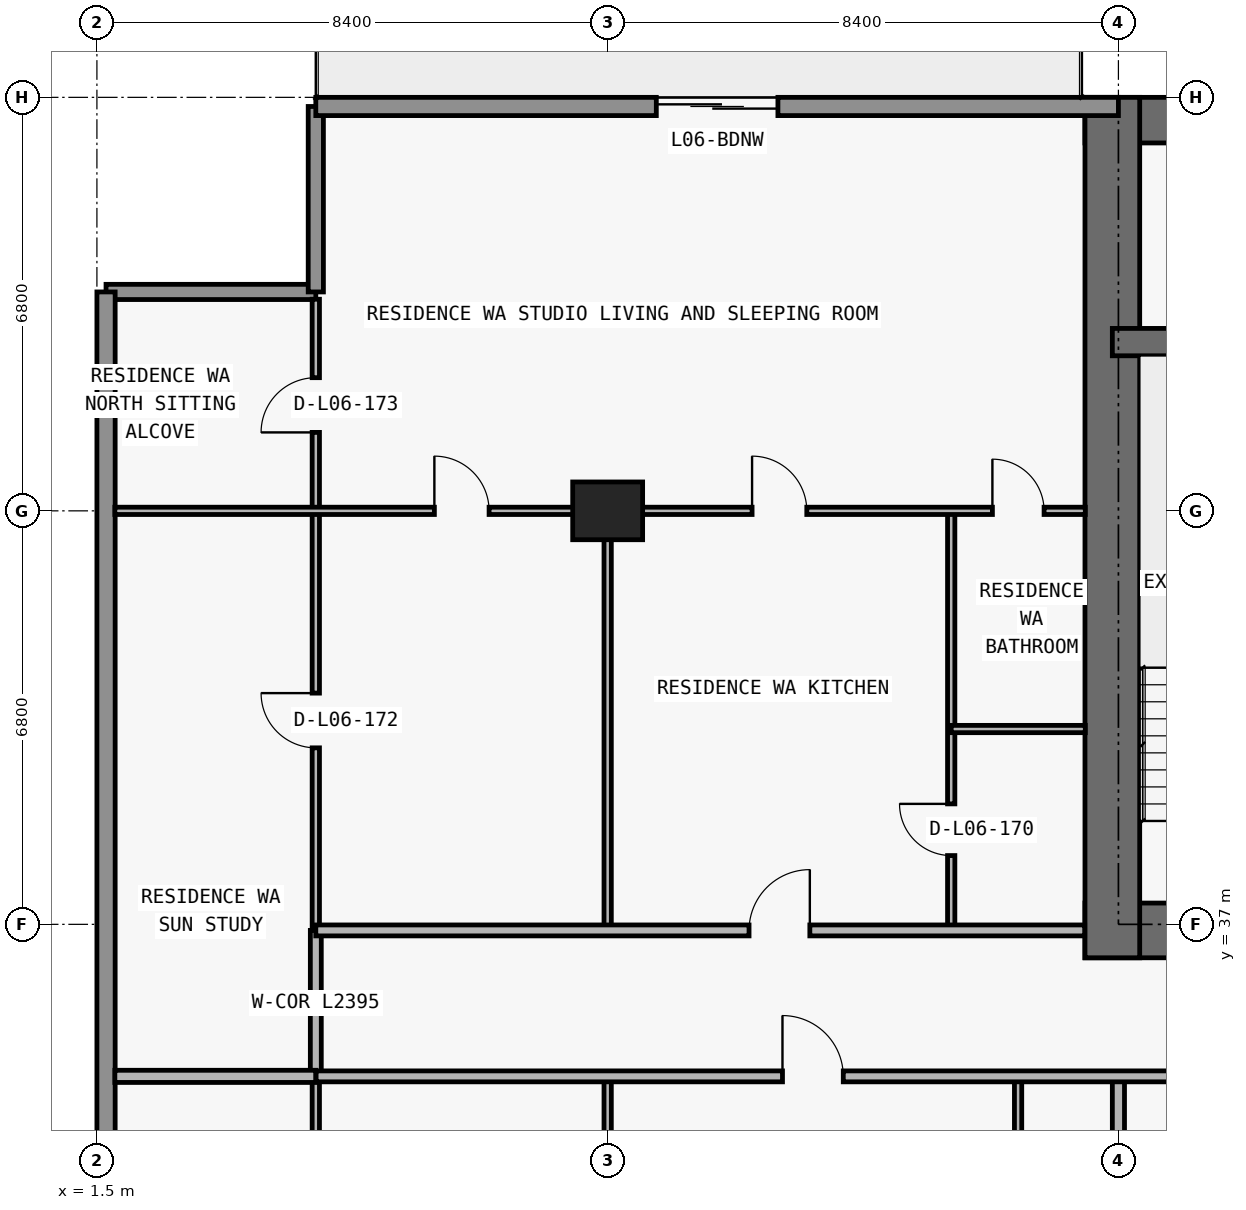
"""IFC4 building model, lengths in metres.
Left out: names, types, materials, properties, quantities, classifications, styles, units other than length and angle.
Written with IfcOpenShell. Run it as: python <this file> out.ifc"""

import sys

from ifc_helpers import new_model, si_unit, direction, frame, frame_2d, origin, origin_2d, place, context, subcontext, project, spatial, rectangle, extrude, element, fill, save


model = new_model("IFC4")
c1 = context("Model", 3, precision=1e-05, world=origin(), true_north=direction((0.0, 1.0)))
c2 = subcontext(c1, "Body", "Model", "MODEL_VIEW")
j1 = project(units=[si_unit("LENGTHUNIT", "METRE"), si_unit("PLANEANGLEUNIT", "RADIAN")], contexts=[c1])
p1 = place(None, origin())
s1 = spatial("IfcSite", under=j1, at=p1, CompositionType="ELEMENT")
p2 = place(p1, origin())
s2 = spatial("IfcBuilding", under=s1, at=p2, CompositionType="ELEMENT")
p3 = place(p2, frame((0.0, 0.0, 30.0)))
s3 = spatial("IfcBuildingStorey", under=s2, at=p3, CompositionType="ELEMENT", Elevation=30.0)
p4 = place(p3, frame((9.9, 43.8, 0.0), z_axis=(0.0, 0.0, 1.0), x_axis=(1.0, 0.0, 0.0)))
e1 = element("IfcColumn", 1, at=p4, inside=s3, PredefinedType="COLUMN", context=c2, shape_type="SweptSolid", body=[
    extrude(rectangle(XDim=1.15, YDim=0.95, at=origin_2d()), origin(), (0.0, 0.0, 1.0), 3.05),
])
p5 = place(p3, frame((17.75, 36.9, 0.0), z_axis=(0.0, 0.0, 1.0), x_axis=(1.0, 0.0, 0.0)))
e2 = element("IfcWall", 2, at=p5, inside=s3, PredefinedType="SHEAR", context=c2, shape_type="SweptSolid", body=[
    extrude(rectangle(XDim=42.3, YDim=0.9, at=frame_2d((21.15, 0.0))), origin(), (0.0, 0.0, 1.0), 3.05),
])
p6 = place(p5, frame((14.55, 0.0, 0.0)))
e3 = element("IfcOpeningElement", 3, at=p6, cuts=e2, PredefinedType="OPENING", context=c2, shape_type="SweptSolid", body=[
    extrude(rectangle(XDim=1.1, YDim=2.15, at=frame_2d((0.55, 1.075))), frame((0.0, 0.46, 0.0), z_axis=(0.0, -1.0, 0.0), x_axis=(1.0, 0.0, 0.0)), (0.0, 0.0, 1.0), 0.92),
])
p7 = place(p5, frame((6.4, 0.0, 0.0)))
e4 = element("IfcOpeningElement", 4, at=p7, cuts=e2, PredefinedType="OPENING", context=c2, shape_type="SweptSolid", body=[
    extrude(rectangle(XDim=1.05, YDim=2.15, at=frame_2d((0.525, 1.075))), frame((0.0, 0.46, 0.0), z_axis=(0.0, -1.0, 0.0), x_axis=(1.0, 0.0, 0.0)), (0.0, 0.0, 1.0), 0.92),
])
p8 = place(p5, frame((34.9, 0.0, 0.0)))
e5 = element("IfcOpeningElement", 5, at=p8, cuts=e2, PredefinedType="OPENING", context=c2, shape_type="SweptSolid", body=[
    extrude(rectangle(XDim=1.05, YDim=2.15, at=frame_2d((0.525, 1.075))), frame((0.0, 0.46, 0.0), z_axis=(0.0, -1.0, 0.0), x_axis=(1.0, 0.0, 0.0)), (0.0, 0.0, 1.0), 0.92),
])
p9 = place(p5, frame((11.012, 0.0, 0.0)))
e6 = element("IfcOpeningElement", 6, at=p9, cuts=e2, PredefinedType="OPENING", context=c2, shape_type="SweptSolid", body=[
    extrude(rectangle(XDim=1.05, YDim=2.15, at=frame_2d((0.525, 1.075))), frame((0.0, 0.46, 0.0), z_axis=(0.0, -1.0, 0.0), x_axis=(1.0, 0.0, 0.0)), (0.0, 0.0, 1.0), 0.92),
])
p10 = place(p5, frame((24.25, 0.0, 0.0)))
e7 = element("IfcOpeningElement", 7, at=p10, cuts=e2, PredefinedType="OPENING", context=c2, shape_type="SweptSolid", body=[
    extrude(rectangle(XDim=1.05, YDim=2.15, at=frame_2d((0.525, 1.075))), frame((0.0, 0.46, 0.0), z_axis=(0.0, -1.0, 0.0), x_axis=(1.0, 0.0, 0.0)), (0.0, 0.0, 1.0), 0.92),
])
p11 = place(p3, frame((17.75, 50.225, 0.0), z_axis=(0.0, 0.0, 1.0), x_axis=(1.0, 0.0, 0.0)))
e8 = element("IfcWall", 8, at=p11, inside=s3, PredefinedType="SHEAR", context=c2, shape_type="SweptSolid", body=[
    extrude(rectangle(XDim=42.3, YDim=0.75, at=frame_2d((21.15, 0.0))), origin(), (0.0, 0.0, 1.0), 3.05),
])
p12 = place(p3, frame((18.2, 36.45, 0.0), z_axis=(0.0, 0.0, 1.0), x_axis=(0.0, 1.0, 0.0)))
e9 = element("IfcWall", 9, at=p12, inside=s3, PredefinedType="SHEAR", context=c2, shape_type="SweptSolid", body=[
    extrude(rectangle(XDim=14.15, YDim=0.9, at=frame_2d((7.075, 0.0))), origin(), (0.0, 0.0, 1.0), 3.05),
])
p13 = place(p3, frame((18.2, 46.575, 0.0), z_axis=(0.0, 0.0, 1.0), x_axis=(1.0, 0.0, 0.0)))
e10 = element("IfcWall", 10, at=p13, inside=s3, PredefinedType="SHEAR", context=c2, shape_type="SweptSolid", body=[
    extrude(rectangle(XDim=41.4, YDim=0.45, at=frame_2d((20.7, 0.0))), origin(), (0.0, 0.0, 1.0), 3.05),
])
p14 = place(p13, frame((7.675, 0.0, 0.0)))
e11 = element("IfcOpeningElement", 11, at=p14, cuts=e10, PredefinedType="OPENING", context=c2, shape_type="SweptSolid", body=[
    extrude(rectangle(XDim=1.05, YDim=2.15, at=frame_2d((0.525, 1.075))), frame((0.0, 0.235, 0.0), z_axis=(0.0, -1.0, 0.0), x_axis=(1.0, 0.0, 0.0)), (0.0, 0.0, 1.0), 0.47),
])
p15 = place(p13, frame((32.725, 0.0, 0.0)))
e12 = element("IfcOpeningElement", 12, at=p15, cuts=e10, PredefinedType="OPENING", context=c2, shape_type="SweptSolid", body=[
    extrude(rectangle(XDim=1.05, YDim=2.15, at=frame_2d((0.525, 1.075))), frame((0.0, 0.235, 0.0), z_axis=(0.0, -1.0, 0.0), x_axis=(1.0, 0.0, 0.0)), (0.0, 0.0, 1.0), 0.47),
])
p16 = place(p3, frame((1.65, 47.4, 0.0), z_axis=(0.0, 0.0, 1.0), x_axis=(1.0, 0.0, 0.0)))
e13 = element("IfcWall", 13, at=p16, inside=s3, PredefinedType="ELEMENTEDWALL", context=c2, shape_type="SweptSolid", body=[
    extrude(rectangle(XDim=3.45, YDim=0.25, at=frame_2d((1.725, 0.0))), origin(), (0.0, 0.0, 1.0), 3.05),
])
p17 = place(p3, frame((5.1, 47.4, 0.0), z_axis=(0.0, 0.0, 1.0), x_axis=(0.0, 1.0, 0.0)))
e14 = element("IfcWall", 14, at=p17, inside=s3, PredefinedType="ELEMENTEDWALL", context=c2, shape_type="SweptSolid", body=[
    extrude(rectangle(XDim=3.05, YDim=0.25, at=frame_2d((1.525, 0.0))), origin(), (0.0, 0.0, 1.0), 3.05),
])
p18 = place(p3, frame((1.65, 26.8, 0.0), z_axis=(0.0, 0.0, 1.0), x_axis=(0.0, 1.0, 0.0)))
e15 = element("IfcWall", 15, at=p18, inside=s3, PredefinedType="STANDARD", context=c2, shape_type="SweptSolid", body=[
    extrude(rectangle(XDim=20.6, YDim=0.3, at=frame_2d((10.3, 0.0))), origin(), (0.0, 0.0, 1.0), 3.05),
])
p19 = place(p3, frame((5.1, 50.45, 0.0), z_axis=(0.0, 0.0, 1.0), x_axis=(1.0, 0.0, 0.0)))
e16 = element("IfcWall", 16, at=p19, inside=s3, PredefinedType="STANDARD", context=c2, shape_type="SweptSolid", body=[
    extrude(rectangle(XDim=13.2, YDim=0.3, at=frame_2d((6.6, 0.0))), origin(), (0.0, 0.0, 1.0), 3.05),
])
p20 = place(p19, frame((5.6, 0.0, 0.0)))
e17 = element("IfcOpeningElement", 17, at=p20, cuts=e16, PredefinedType="OPENING", context=c2, shape_type="SweptSolid", body=[
    extrude(rectangle(XDim=2.0, YDim=2.3, at=frame_2d((1.0, 1.15))), frame((0.0, 0.16, 0.0), z_axis=(0.0, -1.0, 0.0), x_axis=(1.0, 0.0, 0.0)), (0.0, 0.0, 1.0), 0.32),
])
p21 = place(p3, frame((5.1, 27.64, 0.0), z_axis=(0.0, 0.0, 1.0), x_axis=(0.0, 1.0, 0.0)))
e18 = element("IfcWall", 18, at=p21, inside=s3, PredefinedType="PARTITIONING", context=c2, shape_type="SweptSolid", body=[
    extrude(rectangle(XDim=6.86, YDim=0.12, at=frame_2d((3.43, 0.0))), origin(), (0.0, 0.0, 1.0), 3.05),
])
p22 = place(p3, frame((5.1, 34.505, 0.0), z_axis=(0.0, 0.0, 1.0), x_axis=(0.0, 1.0, 0.0)))
e19 = element("IfcWall", 19, at=p22, inside=s3, PredefinedType="PARTITIONING", context=c2, shape_type="SweptSolid", body=[
    extrude(rectangle(XDim=2.395, YDim=0.18, at=frame_2d((1.198, 0.0))), origin(), (0.0, 0.0, 1.0), 3.05),
])
p23 = place(p3, frame((5.1, 36.905, 0.0), z_axis=(0.0, 0.0, 1.0), x_axis=(0.0, 1.0, 0.0)))
e20 = element("IfcWall", 20, at=p23, inside=s3, PredefinedType="PARTITIONING", context=c2, shape_type="SweptSolid", body=[
    extrude(rectangle(XDim=10.375, YDim=0.12, at=frame_2d((5.188, 0.0))), origin(), (0.0, 0.0, 1.0), 3.05),
])
p24 = place(p23, frame((2.998, 0.0, 0.0)))
e21 = element("IfcOpeningElement", 21, at=p24, cuts=e20, PredefinedType="OPENING", context=c2, shape_type="SweptSolid", body=[
    extrude(rectangle(XDim=0.9, YDim=2.15, at=frame_2d((0.45, 1.075))), frame((0.0, 0.07, 0.0), z_axis=(0.0, -1.0, 0.0), x_axis=(1.0, 0.0, 0.0)), (0.0, 0.0, 1.0), 0.14),
])
p25 = place(p23, frame((8.185, 0.0, 0.0)))
e22 = element("IfcOpeningElement", 22, at=p25, cuts=e20, PredefinedType="OPENING", context=c2, shape_type="SweptSolid", body=[
    extrude(rectangle(XDim=0.9, YDim=2.15, at=frame_2d((0.45, 1.075))), frame((0.0, 0.07, 0.0), z_axis=(0.0, -1.0, 0.0), x_axis=(1.0, 0.0, 0.0)), (0.0, 0.0, 1.0), 0.14),
])
p26 = place(p3, frame((9.9, 27.64, 0.0), z_axis=(0.0, 0.0, 1.0), x_axis=(0.0, 1.0, 0.0)))
e23 = element("IfcWall", 23, at=p26, inside=s3, PredefinedType="PARTITIONING", context=c2, shape_type="SweptSolid", body=[
    extrude(rectangle(XDim=6.86, YDim=0.12, at=frame_2d((3.43, 0.0))), origin(), (0.0, 0.0, 1.0), 2.11),
])
p27 = place(p3, frame((9.9, 36.9, 0.0), z_axis=(0.0, 0.0, 1.0), x_axis=(0.0, 1.0, 0.0)))
e24 = element("IfcWall", 24, at=p27, inside=s3, PredefinedType="PARTITIONING", context=c2, shape_type="SweptSolid", body=[
    extrude(rectangle(XDim=6.9, YDim=0.12, at=frame_2d((3.45, 0.0))), origin(), (0.0, 0.0, 1.0), 2.11),
])
p28 = place(p3, frame((15.55, 36.9, 0.0), z_axis=(0.0, 0.0, 1.0), x_axis=(0.0, 1.0, 0.0)))
e25 = element("IfcWall", 25, at=p28, inside=s3, PredefinedType="PARTITIONING", context=c2, shape_type="SweptSolid", body=[
    extrude(rectangle(XDim=6.9, YDim=0.12, at=frame_2d((3.45, 0.0))), origin(), (0.0, 0.0, 1.0), 3.05),
])
p29 = place(p28, frame((1.231, 0.0, 0.0)))
e26 = element("IfcOpeningElement", 26, at=p29, cuts=e25, PredefinedType="OPENING", context=c2, shape_type="SweptSolid", body=[
    extrude(rectangle(XDim=0.85, YDim=2.1, at=frame_2d((0.425, 1.05))), frame((0.0, 0.07, 0.0), z_axis=(0.0, -1.0, 0.0), x_axis=(1.0, 0.0, 0.0)), (0.0, 0.0, 1.0), 0.14),
])
p30 = place(p3, frame((16.65, 27.64, 0.0), z_axis=(0.0, 0.0, 1.0), x_axis=(0.0, 1.0, 0.0)))
e27 = element("IfcWall", 27, at=p30, inside=s3, PredefinedType="PARTITIONING", context=c2, shape_type="SweptSolid", body=[
    extrude(rectangle(XDim=6.86, YDim=0.12, at=frame_2d((3.43, 0.0))), origin(), (0.0, 0.0, 1.0), 3.05),
])
p31 = place(p30, frame((3.005, 0.0, 0.0)))
e28 = element("IfcOpeningElement", 28, at=p31, cuts=e27, PredefinedType="OPENING", context=c2, shape_type="SweptSolid", body=[
    extrude(rectangle(XDim=0.85, YDim=2.1, at=frame_2d((0.425, 1.05))), frame((0.0, 0.07, 0.0), z_axis=(0.0, -1.0, 0.0), x_axis=(1.0, 0.0, 0.0)), (0.0, 0.0, 1.0), 0.14),
])
p32 = place(p3, frame((18.3, 27.64, 0.0), z_axis=(0.0, 0.0, 1.0), x_axis=(0.0, 1.0, 0.0)))
e29 = element("IfcWall", 29, at=p32, inside=s3, PredefinedType="PARTITIONING", context=c2, shape_type="SweptSolid", body=[
    extrude(rectangle(XDim=6.86, YDim=0.2, at=frame_2d((3.43, 0.0))), origin(), (0.0, 0.0, 1.0), 2.11),
])
p33 = place(p3, frame((1.795, 34.5, 0.0), z_axis=(0.0, 0.0, 1.0), x_axis=(1.0, 0.0, 0.0)))
e30 = element("IfcWall", 30, at=p33, inside=s3, PredefinedType="PARTITIONING", context=c2, shape_type="SweptSolid", body=[
    extrude(rectangle(XDim=3.305, YDim=0.2, at=frame_2d((1.653, 0.0))), origin(), (0.0, 0.0, 1.0), 3.05),
])
p34 = place(p3, frame((5.105, 34.5, 0.0), z_axis=(0.0, 0.0, 1.0), x_axis=(1.0, 0.0, 0.0)))
e31 = element("IfcWall", 31, at=p34, inside=s3, PredefinedType="PARTITIONING", context=c2, shape_type="SweptSolid", body=[
    extrude(rectangle(XDim=50.781, YDim=0.18, at=frame_2d((25.391, 0.0))), origin(), (0.0, 0.0, 1.0), 3.05),
])
p35 = place(p34, frame((7.67, 0.0, 0.0)))
e32 = element("IfcOpeningElement", 32, at=p35, cuts=e31, PredefinedType="OPENING", context=c2, shape_type="SweptSolid", body=[
    extrude(rectangle(XDim=1.0, YDim=2.2, at=frame_2d((0.5, 1.1))), frame((0.0, 0.1, 0.0), z_axis=(0.0, -1.0, 0.0), x_axis=(1.0, 0.0, 0.0)), (0.0, 0.0, 1.0), 0.2),
])
p36 = place(p34, frame((16.07, 0.0, 0.0)))
e33 = element("IfcOpeningElement", 33, at=p36, cuts=e31, PredefinedType="OPENING", context=c2, shape_type="SweptSolid", body=[
    extrude(rectangle(XDim=1.0, YDim=2.2, at=frame_2d((0.5, 1.1))), frame((0.0, 0.1, 0.0), z_axis=(0.0, -1.0, 0.0), x_axis=(1.0, 0.0, 0.0)), (0.0, 0.0, 1.0), 0.2),
])
p37 = place(p34, frame((24.47, 0.0, 0.0)))
e34 = element("IfcOpeningElement", 34, at=p37, cuts=e31, PredefinedType="OPENING", context=c2, shape_type="SweptSolid", body=[
    extrude(rectangle(XDim=1.0, YDim=2.2, at=frame_2d((0.5, 1.1))), frame((0.0, 0.1, 0.0), z_axis=(0.0, -1.0, 0.0), x_axis=(1.0, 0.0, 0.0)), (0.0, 0.0, 1.0), 0.2),
])
p38 = place(p34, frame((32.545, 0.0, 0.0)))
e35 = element("IfcOpeningElement", 35, at=p38, cuts=e31, PredefinedType="OPENING", context=c2, shape_type="SweptSolid", body=[
    extrude(rectangle(XDim=1.0, YDim=2.2, at=frame_2d((0.5, 1.1))), frame((0.0, 0.1, 0.0), z_axis=(0.0, -1.0, 0.0), x_axis=(1.0, 0.0, 0.0)), (0.0, 0.0, 1.0), 0.2),
])
p39 = place(p34, frame((47.888, 0.0, 0.0)))
e36 = element("IfcOpeningElement", 36, at=p39, cuts=e31, PredefinedType="OPENING", context=c2, shape_type="SweptSolid", body=[
    extrude(rectangle(XDim=1.0, YDim=2.2, at=frame_2d((0.5, 1.1))), frame((0.0, 0.1, 0.0), z_axis=(0.0, -1.0, 0.0), x_axis=(1.0, 0.0, 0.0)), (0.0, 0.0, 1.0), 0.2),
])
p40 = place(p3, frame((5.1, 36.9, 0.0), z_axis=(0.0, 0.0, 1.0), x_axis=(1.0, 0.0, 0.0)))
e37 = element("IfcWall", 37, at=p40, inside=s3, PredefinedType="PARTITIONING", context=c2, shape_type="SweptSolid", body=[
    extrude(rectangle(XDim=12.645, YDim=0.18, at=frame_2d((6.323, 0.0))), origin(), (0.0, 0.0, 1.0), 3.05),
])
p41 = place(p40, frame((7.125, 0.0, 0.0)))
e38 = element("IfcOpeningElement", 38, at=p41, cuts=e37, PredefinedType="OPENING", context=c2, shape_type="SweptSolid", body=[
    extrude(rectangle(XDim=1.0, YDim=2.2, at=frame_2d((0.5, 1.1))), frame((0.0, 0.1, 0.0), z_axis=(0.0, -1.0, 0.0), x_axis=(1.0, 0.0, 0.0)), (0.0, 0.0, 1.0), 0.2),
])
p42 = place(p3, frame((15.55, 40.212, 0.0), z_axis=(0.0, 0.0, 1.0), x_axis=(1.0, 0.0, 0.0)))
e39 = element("IfcWall", 39, at=p42, inside=s3, PredefinedType="PARTITIONING", context=c2, shape_type="SweptSolid", body=[
    extrude(rectangle(XDim=2.205, YDim=0.12, at=frame_2d((1.103, 0.0))), origin(), (0.0, 0.0, 1.0), 3.05),
])
p43 = place(p3, frame((1.795, 43.8, 0.0), z_axis=(0.0, 0.0, 1.0), x_axis=(1.0, 0.0, 0.0)))
e40 = element("IfcWall", 40, at=p43, inside=s3, PredefinedType="PARTITIONING", context=c2, shape_type="SweptSolid", body=[
    extrude(rectangle(XDim=15.96, YDim=0.12, at=frame_2d((7.98, 0.0))), origin(), (0.0, 0.0, 1.0), 2.339),
])
p44 = place(p43, frame((5.255, 0.0, 0.0)))
e41 = element("IfcOpeningElement", 41, at=p44, cuts=e40, PredefinedType="OPENING", context=c2, shape_type="SweptSolid", body=[
    extrude(rectangle(XDim=0.9, YDim=2.15, at=frame_2d((0.45, 1.075))), frame((0.0, 0.07, 0.0), z_axis=(0.0, -1.0, 0.0), x_axis=(1.0, 0.0, 0.0)), (0.0, 0.0, 1.0), 0.14),
])
p45 = place(p43, frame((10.48, 0.0, 0.0)))
e42 = element("IfcOpeningElement", 42, at=p45, cuts=e40, PredefinedType="OPENING", context=c2, shape_type="SweptSolid", body=[
    extrude(rectangle(XDim=0.9, YDim=2.15, at=frame_2d((0.45, 1.075))), frame((0.0, 0.07, 0.0), z_axis=(0.0, -1.0, 0.0), x_axis=(1.0, 0.0, 0.0)), (0.0, 0.0, 1.0), 0.14),
])
p46 = place(p43, frame((14.433, 0.0, 0.0)))
e43 = element("IfcOpeningElement", 43, at=p46, cuts=e40, PredefinedType="OPENING", context=c2, shape_type="SweptSolid", body=[
    extrude(rectangle(XDim=0.85, YDim=2.1, at=frame_2d((0.425, 1.05))), frame((0.0, 0.07, 0.0), z_axis=(0.0, -1.0, 0.0), x_axis=(1.0, 0.0, 0.0)), (0.0, 0.0, 1.0), 0.14),
])
p47 = place(p20, origin())
e44 = element("IfcDoor", 44, at=p47, inside=s3, OperationType="DOUBLE_DOOR_SLIDING", PredefinedType="DOOR", context=c2, shape_type="SweptSolid", body=[
    extrude(rectangle(XDim=2.0, YDim=2.3, at=frame_2d((1.0, 1.15))), frame((0.0, 0.025, 0.0), z_axis=(0.0, -1.0, 0.0), x_axis=(1.0, 0.0, 0.0)), (0.0, 0.0, 1.0), 0.05),
])
fill(e17, e44)
p48 = place(p35, origin())
e45 = element("IfcDoor", 45, at=p48, inside=s3, OperationType="SINGLE_SWING_LEFT", PredefinedType="DOOR", context=c2, shape_type="SweptSolid", body=[
    extrude(rectangle(XDim=1.0, YDim=2.2, at=frame_2d((0.5, 1.1))), frame((0.0, 0.025, 0.0), z_axis=(0.0, -1.0, 0.0), x_axis=(1.0, 0.0, 0.0)), (0.0, 0.0, 1.0), 0.05),
])
fill(e32, e45)
p49 = place(p44, origin())
e46 = element("IfcDoor", 46, at=p49, inside=s3, OperationType="SINGLE_SWING_LEFT", PredefinedType="DOOR", context=c2, shape_type="SweptSolid", body=[
    extrude(rectangle(XDim=0.9, YDim=2.15, at=frame_2d((0.45, 1.075))), frame((0.0, 0.025, 0.0), z_axis=(0.0, -1.0, 0.0), x_axis=(1.0, 0.0, 0.0)), (0.0, 0.0, 1.0), 0.05),
])
fill(e41, e46)
p50 = place(p41, origin())
e47 = element("IfcDoor", 47, at=p50, inside=s3, OperationType="SINGLE_SWING_RIGHT", PredefinedType="DOOR", context=c2, shape_type="SweptSolid", body=[
    extrude(rectangle(XDim=1.0, YDim=2.2, at=frame_2d((0.5, 1.1))), frame((0.0, 0.025, 0.0), z_axis=(0.0, -1.0, 0.0), x_axis=(1.0, 0.0, 0.0)), (0.0, 0.0, 1.0), 0.05),
])
fill(e38, e47)
p51 = place(p45, origin())
e48 = element("IfcDoor", 48, at=p51, inside=s3, OperationType="SINGLE_SWING_LEFT", PredefinedType="DOOR", context=c2, shape_type="SweptSolid", body=[
    extrude(rectangle(XDim=0.9, YDim=2.15, at=frame_2d((0.45, 1.075))), frame((0.0, 0.025, 0.0), z_axis=(0.0, -1.0, 0.0), x_axis=(1.0, 0.0, 0.0)), (0.0, 0.0, 1.0), 0.05),
])
fill(e42, e48)
p52 = place(p29, origin())
e49 = element("IfcDoor", 49, at=p52, inside=s3, OperationType="SINGLE_SWING_RIGHT", PredefinedType="DOOR", context=c2, shape_type="SweptSolid", body=[
    extrude(rectangle(XDim=0.85, YDim=2.1, at=frame_2d((0.425, 1.05))), frame((0.0, 0.025, 0.0), z_axis=(0.0, -1.0, 0.0), x_axis=(1.0, 0.0, 0.0)), (0.0, 0.0, 1.0), 0.05),
])
fill(e26, e49)
p53 = place(p46, origin())
e50 = element("IfcDoor", 50, at=p53, inside=s3, OperationType="SINGLE_SWING_LEFT", PredefinedType="DOOR", context=c2, shape_type="SweptSolid", body=[
    extrude(rectangle(XDim=0.85, YDim=2.1, at=frame_2d((0.425, 1.05))), frame((0.0, 0.025, 0.0), z_axis=(0.0, -1.0, 0.0), x_axis=(1.0, 0.0, 0.0)), (0.0, 0.0, 1.0), 0.05),
])
fill(e43, e50)
p54 = place(p24, origin())
e51 = element("IfcDoor", 51, at=p54, inside=s3, OperationType="SINGLE_SWING_RIGHT", PredefinedType="DOOR", context=c2, shape_type="SweptSolid", body=[
    extrude(rectangle(XDim=0.9, YDim=2.15, at=frame_2d((0.45, 1.075))), frame((0.0, 0.025, 0.0), z_axis=(0.0, -1.0, 0.0), x_axis=(1.0, 0.0, 0.0)), (0.0, 0.0, 1.0), 0.05),
])
fill(e21, e51)
p55 = place(p25, origin())
e52 = element("IfcDoor", 52, at=p55, inside=s3, OperationType="SINGLE_SWING_LEFT", PredefinedType="DOOR", context=c2, shape_type="SweptSolid", body=[
    extrude(rectangle(XDim=0.9, YDim=2.15, at=frame_2d((0.45, 1.075))), frame((0.0, 0.025, 0.0), z_axis=(0.0, -1.0, 0.0), x_axis=(1.0, 0.0, 0.0)), (0.0, 0.0, 1.0), 0.05),
])
fill(e22, e52)
save(model, sys.argv[1])
